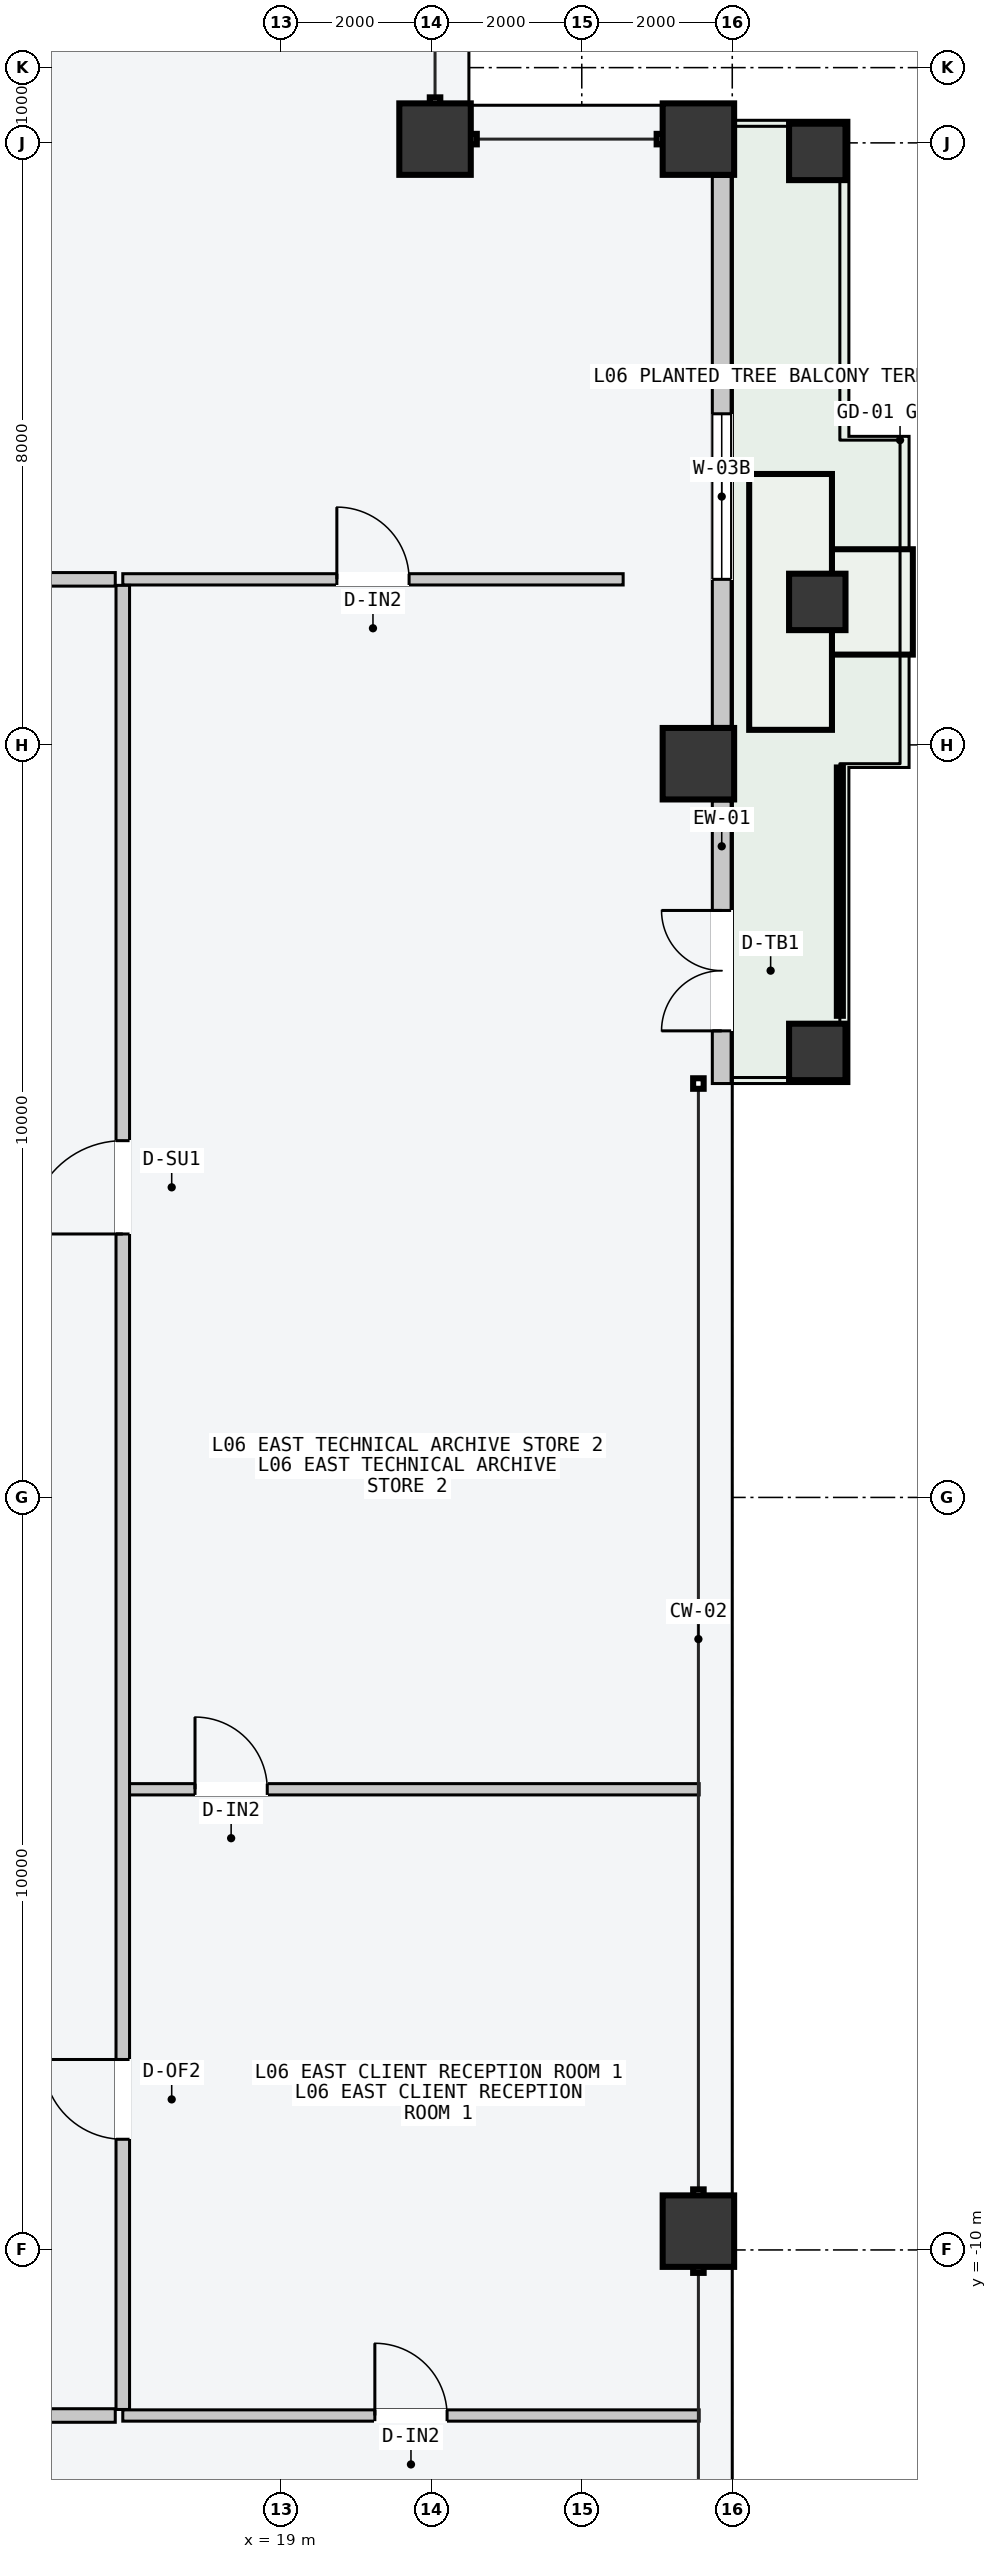
"""IFC4 building model, lengths in metres.
Left out: names, types, materials, properties, quantities, classifications, styles, units other than length and angle.
Written with IfcOpenShell. Run it as: python <this file> out.ifc"""

import sys

from ifc_helpers import new_model, si_unit, direction, frame, frame_2d, origin, origin_2d, place, context, subcontext, project, spatial, rectangle, hollow_rectangle, extrude, element, fill, save


model = new_model("IFC4")
c1 = context("Model", 3, precision=1e-05, world=origin(), true_north=direction((0.0, 1.0)))
c2 = subcontext(c1, "Body", "Model", "MODEL_VIEW")
j1 = project(units=[si_unit("LENGTHUNIT", "METRE"), si_unit("PLANEANGLEUNIT", "RADIAN")], contexts=[c1])
p1 = place(None, origin())
s1 = spatial("IfcSite", under=j1, at=p1, CompositionType="ELEMENT")
p2 = place(p1, origin())
s2 = spatial("IfcBuilding", under=s1, at=p2, CompositionType="ELEMENT")
p3 = place(p2, frame((0.0, 0.0, 27.6)))
s3 = spatial("IfcBuildingStorey", under=s2, at=p3, CompositionType="ELEMENT", Elevation=27.6)
for number, where, z_axis, x_axis in (
    (1, (24.55, -9.75, 0.0), (0.0, 0.0, 1.0), (0.0, 1.0, 0.0)),
    (2, (24.55, 9.75, 0.0), (0.0, 0.0, 1.0), (0.0, 1.0, 0.0)),
    (3, (24.55, 18.05, 0.0), (0.0, 0.0, 1.0), (0.0, 1.0, 0.0)),
    (4, (21.05, 18.05, 0.0), (0.0, 0.0, 1.0), (1.0, 0.0, 0.0)),
):
    element("IfcColumn", number, at=place(p3, frame(where, z_axis=z_axis, x_axis=x_axis)), inside=s3, PredefinedType="COLUMN", context=c2, shape_type="SweptSolid", body=[
        extrude(hollow_rectangle(XDim=0.95, YDim=0.95, WallThickness=0.048, at=origin_2d()), origin(), (0.0, 0.0, 1.0), 3.6),
    ])
for number, where, z_axis, x_axis in (
    (5, (26.13, 5.92, -0.2), (0.0, 0.0, 1.0), (0.0, 1.0, 0.0)),
    (6, (26.13, 17.88, -0.2), (0.0, 0.0, 1.0), (0.0, 1.0, 0.0)),
    (7, (26.13, 11.9, -0.2), (0.0, 0.0, 1.0), (0.0, 1.0, 0.0)),
):
    element("IfcColumn", number, at=place(p3, frame(where, z_axis=z_axis, x_axis=x_axis)), inside=s3, PredefinedType="COLUMN", context=c2, shape_type="SweptSolid", body=[
        extrude(hollow_rectangle(XDim=0.75, YDim=0.75, WallThickness=0.032, at=origin_2d()), origin(), (0.0, 0.0, 1.0), 3.8),
    ])
p4 = place(p3, frame((24.86, 5.5, 0.0), z_axis=(0.0, 0.0, 1.0), x_axis=(0.0, 1.0, 0.0)))
e8 = element("IfcWall", 8, at=p4, inside=s3, PredefinedType="STANDARD", context=c2, shape_type="SweptSolid", body=[
    extrude(rectangle(XDim=3.755, YDim=0.25, at=frame_2d((1.877, 0.0))), origin(), (0.0, 0.0, 1.0), 3.4),
])
p5 = place(p4, frame((0.7, 0.0, 0.0)))
e9 = element("IfcOpeningElement", 9, at=p5, cuts=e8, PredefinedType="OPENING", context=c2, shape_type="SweptSolid", body=[
    extrude(rectangle(XDim=1.6, YDim=2.2, at=frame_2d((0.8, 1.1))), frame((0.0, 0.135, 0.0), z_axis=(0.0, -1.0, 0.0), x_axis=(1.0, 0.0, 0.0)), (0.0, 0.0, 1.0), 0.27),
])
p6 = place(p3, frame((24.86, 10.245, 0.0), z_axis=(0.0, 0.0, 1.0), x_axis=(0.0, 1.0, 0.0)))
e10 = element("IfcWall", 10, at=p6, inside=s3, PredefinedType="STANDARD", context=c2, shape_type="SweptSolid", body=[
    extrude(rectangle(XDim=7.31, YDim=0.25, at=frame_2d((3.655, 0.0))), origin(), (0.0, 0.0, 1.0), 3.4),
])
p7 = place(p6, frame((1.955, 0.0, 0.85)))
e11 = element("IfcOpeningElement", 11, at=p7, cuts=e10, PredefinedType="OPENING", context=c2, shape_type="SweptSolid", body=[
    extrude(rectangle(XDim=2.2, YDim=2.1, at=frame_2d((1.1, 1.05))), frame((0.0, 0.135, 0.0), z_axis=(0.0, -1.0, 0.0), x_axis=(1.0, 0.0, 0.0)), (0.0, 0.0, 1.0), 0.27),
])
p8 = place(p3, frame((-16.8, 12.2, 0.0), z_axis=(0.0, 0.0, 1.0), x_axis=(1.0, 0.0, 0.0)))
e12 = element("IfcWall", 12, at=p8, inside=s3, PredefinedType="PARTITIONING", context=c2, shape_type="SweptSolid", body=[
    extrude(rectangle(XDim=33.6, YDim=0.18, at=frame_2d((16.8, 0.0))), origin(), (0.0, 0.0, 1.0), 3.4),
])
p9 = place(p8, frame((4.704, 0.0, 0.0)))
e13 = element("IfcOpeningElement", 13, at=p9, cuts=e12, PredefinedType="OPENING", context=c2, shape_type="SweptSolid", body=[
    extrude(rectangle(XDim=1.02, YDim=2.2, at=frame_2d((0.51, 1.1))), frame((0.0, 0.1, 0.0), z_axis=(0.0, -1.0, 0.0), x_axis=(1.0, 0.0, 0.0)), (0.0, 0.0, 1.0), 0.2),
])
p10 = place(p8, frame((21.484, 0.0, 0.0)))
e14 = element("IfcOpeningElement", 14, at=p10, cuts=e12, PredefinedType="OPENING", context=c2, shape_type="SweptSolid", body=[
    extrude(rectangle(XDim=1.06, YDim=2.2, at=frame_2d((0.53, 1.1))), frame((0.0, 0.1, 0.0), z_axis=(0.0, -1.0, 0.0), x_axis=(1.0, 0.0, 0.0)), (0.0, 0.0, 1.0), 0.2),
])
p11 = place(p3, frame((16.9, 12.2, 0.0), z_axis=(0.0, 0.0, 1.0), x_axis=(1.0, 0.0, 0.0)))
e15 = element("IfcWall", 15, at=p11, inside=s3, PredefinedType="PARTITIONING", context=c2, shape_type="SweptSolid", body=[
    extrude(rectangle(XDim=6.65, YDim=0.15, at=frame_2d((3.325, 0.0))), origin(), (0.0, 0.0, 1.0), 3.4),
])
p12 = place(p11, frame((2.845, 0.0, 0.0)))
e16 = element("IfcOpeningElement", 16, at=p12, cuts=e15, PredefinedType="OPENING", context=c2, shape_type="SweptSolid", body=[
    extrude(rectangle(XDim=0.96, YDim=2.18, at=frame_2d((0.48, 1.09))), frame((0.0, 0.085, 0.0), z_axis=(0.0, -1.0, 0.0), x_axis=(1.0, 0.0, 0.0)), (0.0, 0.0, 1.0), 0.17),
])
p13 = place(p3, frame((-16.8, -12.2, 0.0), z_axis=(0.0, 0.0, 1.0), x_axis=(1.0, 0.0, 0.0)))
e17 = element("IfcWall", 17, at=p13, inside=s3, PredefinedType="PARTITIONING", context=c2, shape_type="SweptSolid", body=[
    extrude(rectangle(XDim=33.6, YDim=0.18, at=frame_2d((16.8, 0.0))), origin(), (0.0, 0.0, 1.0), 3.4),
])
p14 = place(p13, frame((6.505, 0.0, 0.0)))
e18 = element("IfcOpeningElement", 18, at=p14, cuts=e17, PredefinedType="OPENING", context=c2, shape_type="SweptSolid", body=[
    extrude(rectangle(XDim=1.4, YDim=2.2, at=frame_2d((0.7, 1.1))), frame((0.0, 0.1, 0.0), z_axis=(0.0, -1.0, 0.0), x_axis=(1.0, 0.0, 0.0)), (0.0, 0.0, 1.0), 0.2),
])
p15 = place(p13, frame((20.133, 0.0, 0.0)))
e19 = element("IfcOpeningElement", 19, at=p15, cuts=e17, PredefinedType="OPENING", context=c2, shape_type="SweptSolid", body=[
    extrude(rectangle(XDim=0.9, YDim=2.15, at=frame_2d((0.45, 1.075))), frame((0.0, 0.1, 0.0), z_axis=(0.0, -1.0, 0.0), x_axis=(1.0, 0.0, 0.0)), (0.0, 0.0, 1.0), 0.2),
])
p16 = place(p13, frame((29.698, 0.0, 0.0)))
e20 = element("IfcOpeningElement", 20, at=p16, cuts=e17, PredefinedType="OPENING", context=c2, shape_type="SweptSolid", body=[
    extrude(rectangle(XDim=0.96, YDim=2.18, at=frame_2d((0.48, 1.09))), frame((0.0, 0.1, 0.0), z_axis=(0.0, -1.0, 0.0), x_axis=(1.0, 0.0, 0.0)), (0.0, 0.0, 1.0), 0.2),
])
p17 = place(p3, frame((16.9, -12.2, 0.0), z_axis=(0.0, 0.0, 1.0), x_axis=(1.0, 0.0, 0.0)))
e21 = element("IfcWall", 21, at=p17, inside=s3, PredefinedType="PARTITIONING", context=c2, shape_type="SweptSolid", body=[
    extrude(rectangle(XDim=7.66, YDim=0.15, at=frame_2d((3.83, 0.0))), origin(), (0.0, 0.0, 1.0), 3.4),
])
p18 = place(p17, frame((3.35, 0.0, 0.0)))
e22 = element("IfcOpeningElement", 22, at=p18, cuts=e21, PredefinedType="OPENING", context=c2, shape_type="SweptSolid", body=[
    extrude(rectangle(XDim=0.96, YDim=2.18, at=frame_2d((0.48, 1.09))), frame((0.0, 0.085, 0.0), z_axis=(0.0, -1.0, 0.0), x_axis=(1.0, 0.0, 0.0)), (0.0, 0.0, 1.0), 0.17),
])
p19 = place(p3, frame((16.96, -3.878, 0.0), z_axis=(0.0, 0.0, 1.0), x_axis=(1.0, 0.0, 0.0)))
e23 = element("IfcWall", 23, at=p19, inside=s3, PredefinedType="PARTITIONING", context=c2, shape_type="SweptSolid", body=[
    extrude(rectangle(XDim=7.6, YDim=0.15, at=frame_2d((3.8, 0.0))), origin(), (0.0, 0.0, 1.0), 3.4),
])
p20 = place(p19, frame((0.9, 0.0, 0.0)))
e24 = element("IfcOpeningElement", 24, at=p20, cuts=e23, PredefinedType="OPENING", context=c2, shape_type="SweptSolid", body=[
    extrude(rectangle(XDim=0.96, YDim=2.18, at=frame_2d((0.48, 1.09))), frame((0.0, 0.085, 0.0), z_axis=(0.0, -1.0, 0.0), x_axis=(1.0, 0.0, 0.0)), (0.0, 0.0, 1.0), 0.17),
])
p21 = place(p3, frame((16.9, -12.12, 0.0), z_axis=(0.0, 0.0, 1.0), x_axis=(0.0, 1.0, 0.0)))
e25 = element("IfcWall", 25, at=p21, inside=s3, PredefinedType="PARTITIONING", context=c2, shape_type="SweptSolid", body=[
    extrude(rectangle(XDim=24.24, YDim=0.18, at=frame_2d((12.12, 0.0))), origin(), (0.0, 0.0, 1.0), 3.4),
])
p22 = place(p21, frame((3.591, 0.0, 0.0)))
e26 = element("IfcOpeningElement", 26, at=p22, cuts=e25, PredefinedType="OPENING", context=c2, shape_type="SweptSolid", body=[
    extrude(rectangle(XDim=1.06, YDim=2.2, at=frame_2d((0.53, 1.1))), frame((0.0, 0.1, 0.0), z_axis=(0.0, -1.0, 0.0), x_axis=(1.0, 0.0, 0.0)), (0.0, 0.0, 1.0), 0.2),
])
p23 = place(p21, frame((15.621, 0.0, 0.0)))
e27 = element("IfcOpeningElement", 27, at=p23, cuts=e25, PredefinedType="OPENING", context=c2, shape_type="SweptSolid", body=[
    extrude(rectangle(XDim=1.24, YDim=2.24, at=frame_2d((0.62, 1.12))), frame((0.0, 0.1, 0.0), z_axis=(0.0, -1.0, 0.0), x_axis=(1.0, 0.0, 0.0)), (0.0, 0.0, 1.0), 0.2),
])
p24 = place(p5, origin())
e28 = element("IfcDoor", 28, at=p24, inside=s3, OperationType="DOUBLE_DOOR_SINGLE_SWING", PredefinedType="DOOR", context=c2, shape_type="SweptSolid", body=[
    extrude(rectangle(XDim=1.6, YDim=2.2, at=frame_2d((0.8, 1.1))), frame((0.0, 0.025, 0.0), z_axis=(0.0, -1.0, 0.0), x_axis=(1.0, 0.0, 0.0)), (0.0, 0.0, 1.0), 0.05),
])
fill(e9, e28)
p25 = place(p7, origin())
e29 = element("IfcWindow", 29, at=p25, inside=s3, PartitioningType="SINGLE_PANEL", PredefinedType="WINDOW", context=c2, shape_type="SweptSolid", body=[
    extrude(rectangle(XDim=2.2, YDim=2.1, at=frame_2d((1.1, 1.05))), frame((0.0, 0.03, 0.0), z_axis=(0.0, -1.0, 0.0), x_axis=(1.0, 0.0, 0.0)), (0.0, 0.0, 1.0), 0.06),
])
fill(e11, e29)
p26 = place(p12, origin())
e30 = element("IfcDoor", 30, at=p26, inside=s3, OperationType="SINGLE_SWING_LEFT", PredefinedType="DOOR", context=c2, shape_type="SweptSolid", body=[
    extrude(rectangle(XDim=0.96, YDim=2.18, at=frame_2d((0.48, 1.09))), frame((0.0, 0.025, 0.0), z_axis=(0.0, -1.0, 0.0), x_axis=(1.0, 0.0, 0.0)), (0.0, 0.0, 1.0), 0.05),
])
fill(e16, e30)
p27 = place(p18, origin())
e31 = element("IfcDoor", 31, at=p27, inside=s3, OperationType="SINGLE_SWING_LEFT", PredefinedType="DOOR", context=c2, shape_type="SweptSolid", body=[
    extrude(rectangle(XDim=0.96, YDim=2.18, at=frame_2d((0.48, 1.09))), frame((0.0, 0.025, 0.0), z_axis=(0.0, -1.0, 0.0), x_axis=(1.0, 0.0, 0.0)), (0.0, 0.0, 1.0), 0.05),
])
fill(e22, e31)
p28 = place(p20, origin())
e32 = element("IfcDoor", 32, at=p28, inside=s3, OperationType="SINGLE_SWING_LEFT", PredefinedType="DOOR", context=c2, shape_type="SweptSolid", body=[
    extrude(rectangle(XDim=0.96, YDim=2.18, at=frame_2d((0.48, 1.09))), frame((0.0, 0.025, 0.0), z_axis=(0.0, -1.0, 0.0), x_axis=(1.0, 0.0, 0.0)), (0.0, 0.0, 1.0), 0.05),
])
fill(e24, e32)
p29 = place(p22, origin())
e33 = element("IfcDoor", 33, at=p29, inside=s3, OperationType="SINGLE_SWING_RIGHT", PredefinedType="DOOR", context=c2, shape_type="SweptSolid", body=[
    extrude(rectangle(XDim=1.06, YDim=2.2, at=frame_2d((0.53, 1.1))), frame((0.0, 0.025, 0.0), z_axis=(0.0, -1.0, 0.0), x_axis=(1.0, 0.0, 0.0)), (0.0, 0.0, 1.0), 0.05),
])
fill(e26, e33)
p30 = place(p23, origin())
e34 = element("IfcDoor", 34, at=p30, inside=s3, OperationType="SINGLE_SWING_LEFT", PredefinedType="DOOR", context=c2, shape_type="SweptSolid", body=[
    extrude(rectangle(XDim=1.24, YDim=2.24, at=frame_2d((0.62, 1.12))), frame((0.0, 0.025, 0.0), z_axis=(0.0, -1.0, 0.0), x_axis=(1.0, 0.0, 0.0)), (0.0, 0.0, 1.0), 0.05),
])
fill(e27, e34)
save(model, sys.argv[1])
